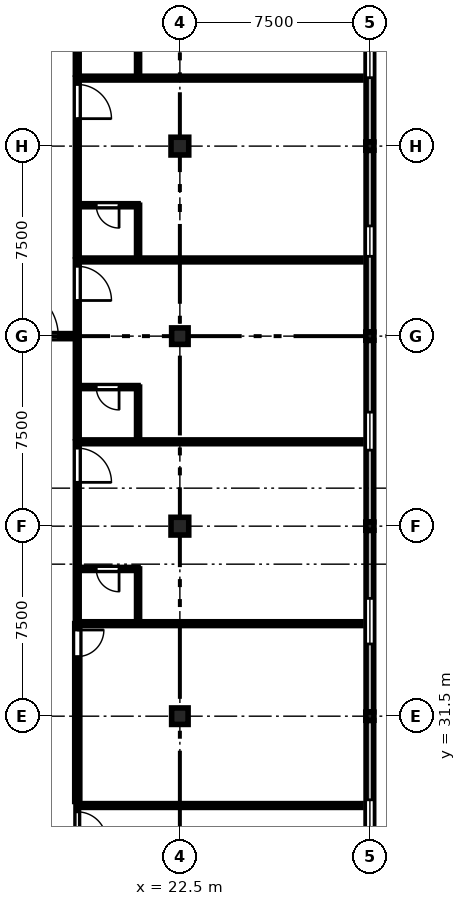
"""IFC4 building model, lengths in metres.
Left out: names, types, materials, properties, quantities, classifications, styles, units other than length and angle.
Written with IfcOpenShell. Run it as: python <this file> out.ifc"""

import sys

from ifc_helpers import new_model, si_unit, direction, frame, frame_2d, origin, origin_2d, place, context, subcontext, project, spatial, rectangle, extrude, element, fill, save


model = new_model("IFC4")
c1 = context("Model", 3, precision=1e-05, world=origin(), true_north=direction((0.0, 1.0)))
c2 = subcontext(c1, "Body", "Model", "MODEL_VIEW")
j1 = project(units=[si_unit("LENGTHUNIT", "METRE"), si_unit("PLANEANGLEUNIT", "RADIAN")], contexts=[c1])
p1 = place(None, origin())
s1 = spatial("IfcSite", under=j1, at=p1, CompositionType="ELEMENT")
p2 = place(p1, origin())
s2 = spatial("IfcBuilding", under=s1, at=p2, CompositionType="ELEMENT")
p3 = place(p2, frame((0.0, 0.0, 17.85)))
s3 = spatial("IfcBuildingStorey", under=s2, at=p3, CompositionType="ELEMENT", Elevation=17.85)
p4 = place(p3, frame((22.5, 31.5, 0.0), z_axis=(0.0, 0.0, 1.0), x_axis=(1.0, 0.0, 0.0)))
e1 = element("IfcColumn", 1, at=p4, inside=s3, PredefinedType="COLUMN", context=c2, shape_type="SweptSolid", body=[
    extrude(rectangle(XDim=0.65, YDim=0.65, at=origin_2d()), origin(), (0.0, 0.0, 1.0), 4.05),
])
p5 = place(p3, frame((22.5, 39.0, 0.0), z_axis=(0.0, 0.0, 1.0), x_axis=(1.0, 0.0, 0.0)))
e2 = element("IfcColumn", 2, at=p5, inside=s3, PredefinedType="COLUMN", context=c2, shape_type="SweptSolid", body=[
    extrude(rectangle(XDim=0.7, YDim=0.7, at=origin_2d()), origin(), (0.0, 0.0, 1.0), 4.05),
])
p6 = place(p3, frame((22.5, 46.5, 0.0), z_axis=(0.0, 0.0, 1.0), x_axis=(1.0, 0.0, 0.0)))
e3 = element("IfcColumn", 3, at=p6, inside=s3, PredefinedType="COLUMN", context=c2, shape_type="SweptSolid", body=[
    extrude(rectangle(XDim=0.65, YDim=0.65, at=origin_2d()), origin(), (0.0, 0.0, 1.0), 4.05),
])
p7 = place(p3, frame((22.5, 54.0, 0.0), z_axis=(0.0, 0.0, 1.0), x_axis=(1.0, 0.0, 0.0)))
e4 = element("IfcColumn", 4, at=p7, inside=s3, PredefinedType="COLUMN", context=c2, shape_type="SweptSolid", body=[
    extrude(rectangle(XDim=0.7, YDim=0.7, at=origin_2d()), origin(), (0.0, 0.0, 1.0), 4.05),
])
for number, where, z_axis, x_axis in (
    (5, (30.0, 31.5, 0.0), (0.0, 0.0, 1.0), (1.0, 0.0, 0.0)),
    (6, (30.0, 39.0, 0.0), (0.0, 0.0, 1.0), (1.0, 0.0, 0.0)),
    (7, (30.0, 46.5, 0.0), (0.0, 0.0, 1.0), (1.0, 0.0, 0.0)),
    (8, (30.0, 54.0, 0.0), (0.0, 0.0, 1.0), (1.0, 0.0, 0.0)),
):
    element("IfcColumn", number, at=place(p3, frame(where, z_axis=z_axis, x_axis=x_axis)), inside=s3, PredefinedType="COLUMN", context=c2, shape_type="SweptSolid", body=[
        extrude(rectangle(XDim=0.32, YDim=0.32, at=origin_2d()), origin(), (0.0, 0.0, 1.0), 4.05),
    ])
p8 = place(p3, frame((30.0, 31.33, 0.0), z_axis=(0.0, 0.0, 1.0), x_axis=(0.0, -1.0, 0.0)))
e9 = element("IfcWall", 9, at=p8, inside=s3, PredefinedType="STANDARD", context=c2, shape_type="SweptSolid", body=[
    extrude(rectangle(XDim=8.66, YDim=0.3, at=frame_2d((4.33, 0.0))), origin(), (0.0, 0.0, 1.0), 3.22),
])
p9 = place(p8, frame((3.13, 0.0, 0.9)))
e10 = element("IfcOpeningElement", 10, at=p9, cuts=e9, PredefinedType="OPENING", context=c2, shape_type="SweptSolid", body=[
    extrude(rectangle(XDim=2.4, YDim=2.04, at=frame_2d((1.2, 1.02))), frame((0.0, 0.16, 0.0), z_axis=(0.0, -1.0, 0.0), x_axis=(1.0, 0.0, 0.0)), (0.0, 0.0, 1.0), 0.32),
])
p10 = place(p3, frame((30.0, 38.83, 0.0), z_axis=(0.0, 0.0, 1.0), x_axis=(0.0, -1.0, 0.0)))
e11 = element("IfcWall", 11, at=p10, inside=s3, PredefinedType="STANDARD", context=c2, shape_type="SweptSolid", body=[
    extrude(rectangle(XDim=7.16, YDim=0.3, at=frame_2d((3.58, 0.0))), origin(), (0.0, 0.0, 1.0), 3.17),
])
p11 = place(p10, frame((2.68, 0.0, 0.9)))
e12 = element("IfcOpeningElement", 12, at=p11, cuts=e11, PredefinedType="OPENING", context=c2, shape_type="SweptSolid", body=[
    extrude(rectangle(XDim=1.8, YDim=1.99, at=frame_2d((0.9, 0.995))), frame((0.0, 0.16, 0.0), z_axis=(0.0, -1.0, 0.0), x_axis=(1.0, 0.0, 0.0)), (0.0, 0.0, 1.0), 0.32),
])
p12 = place(p3, frame((30.0, 46.33, 0.0), z_axis=(0.0, 0.0, 1.0), x_axis=(0.0, -1.0, 0.0)))
e13 = element("IfcWall", 13, at=p12, inside=s3, PredefinedType="STANDARD", context=c2, shape_type="SweptSolid", body=[
    extrude(rectangle(XDim=7.16, YDim=0.3, at=frame_2d((3.58, 0.0))), origin(), (0.0, 0.0, 1.0), 3.17),
])
p13 = place(p12, frame((2.83, 0.0, 0.9)))
e14 = element("IfcOpeningElement", 14, at=p13, cuts=e13, PredefinedType="OPENING", context=c2, shape_type="SweptSolid", body=[
    extrude(rectangle(XDim=1.5, YDim=1.99, at=frame_2d((0.75, 0.995))), frame((0.0, 0.16, 0.0), z_axis=(0.0, -1.0, 0.0), x_axis=(1.0, 0.0, 0.0)), (0.0, 0.0, 1.0), 0.32),
])
p14 = place(p3, frame((30.0, 53.83, 0.0), z_axis=(0.0, 0.0, 1.0), x_axis=(0.0, -1.0, 0.0)))
e15 = element("IfcWall", 15, at=p14, inside=s3, PredefinedType="STANDARD", context=c2, shape_type="SweptSolid", body=[
    extrude(rectangle(XDim=7.16, YDim=0.3, at=frame_2d((3.58, 0.0))), origin(), (0.0, 0.0, 1.0), 3.17),
])
p15 = place(p14, frame((2.98, 0.0, 0.9)))
e16 = element("IfcOpeningElement", 16, at=p15, cuts=e15, PredefinedType="OPENING", context=c2, shape_type="SweptSolid", body=[
    extrude(rectangle(XDim=1.2, YDim=1.99, at=frame_2d((0.6, 0.995))), frame((0.0, 0.16, 0.0), z_axis=(0.0, -1.0, 0.0), x_axis=(1.0, 0.0, 0.0)), (0.0, 0.0, 1.0), 0.32),
])
p16 = place(p3, frame((30.0, 61.33, 0.0), z_axis=(0.0, 0.0, 1.0), x_axis=(0.0, -1.0, 0.0)))
e17 = element("IfcWall", 17, at=p16, inside=s3, PredefinedType="STANDARD", context=c2, shape_type="SweptSolid", body=[
    extrude(rectangle(XDim=7.16, YDim=0.3, at=frame_2d((3.58, 0.0))), origin(), (0.0, 0.0, 1.0), 3.17),
])
p17 = place(p16, frame((2.53, 0.0, 0.9)))
e18 = element("IfcOpeningElement", 18, at=p17, cuts=e17, PredefinedType="OPENING", context=c2, shape_type="SweptSolid", body=[
    extrude(rectangle(XDim=2.1, YDim=1.99, at=frame_2d((1.05, 0.995))), frame((0.0, 0.16, 0.0), z_axis=(0.0, -1.0, 0.0), x_axis=(1.0, 0.0, 0.0)), (0.0, 0.0, 1.0), 0.32),
])
p18 = place(p3, frame((18.45, 27.975, 0.0), z_axis=(0.0, 0.0, 1.0), x_axis=(0.0, -1.0, 0.0)))
e19 = element("IfcWall", 19, at=p18, inside=s3, PredefinedType="PARTITIONING", context=c2, shape_type="SweptSolid", body=[
    extrude(rectangle(XDim=7.017, YDim=0.1, at=frame_2d((3.509, 0.0))), origin(), (0.0, 0.0, 1.0), 3.355),
])
p19 = place(p18, frame((0.25, 0.0, 0.0)))
e20 = element("IfcOpeningElement", 20, at=p19, cuts=e19, PredefinedType="OPENING", context=c2, shape_type="SweptSolid", body=[
    extrude(rectangle(XDim=1.15, YDim=2.2, at=frame_2d((0.575, 1.1))), frame((0.0, 0.06, 0.0), z_axis=(0.0, -1.0, 0.0), x_axis=(1.0, 0.0, 0.0)), (0.0, 0.0, 1.0), 0.12),
])
p20 = place(p3, frame((18.45, 35.152, 0.0), z_axis=(0.0, 0.0, 1.0), x_axis=(0.0, -1.0, 0.0)))
e21 = element("IfcWall", 21, at=p20, inside=s3, PredefinedType="STANDARD", context=c2, shape_type="SweptSolid", body=[
    extrude(rectangle(XDim=7.017, YDim=0.2, at=frame_2d((3.509, 0.0))), origin(), (0.0, 0.0, 1.0), 3.355),
])
p21 = place(p20, frame((0.25, 0.0, 0.0)))
e22 = element("IfcOpeningElement", 22, at=p21, cuts=e21, PredefinedType="OPENING", context=c2, shape_type="SweptSolid", body=[
    extrude(rectangle(XDim=1.05, YDim=2.2, at=frame_2d((0.525, 1.1))), frame((0.0, 0.11, 0.0), z_axis=(0.0, -1.0, 0.0), x_axis=(1.0, 0.0, 0.0)), (0.0, 0.0, 1.0), 0.22),
])
p22 = place(p3, frame((18.45, 42.329, 0.0), z_axis=(0.0, 0.0, 1.0), x_axis=(0.0, -1.0, 0.0)))
e23 = element("IfcWall", 23, at=p22, inside=s3, PredefinedType="PARTITIONING", context=c2, shape_type="SweptSolid", body=[
    extrude(rectangle(XDim=7.017, YDim=0.15, at=frame_2d((3.509, 0.0))), origin(), (0.0, 0.0, 1.0), 3.755),
])
p23 = place(p22, frame((0.25, 0.0, 0.0)))
e24 = element("IfcOpeningElement", 24, at=p23, cuts=e23, PredefinedType="OPENING", context=c2, shape_type="SweptSolid", body=[
    extrude(rectangle(XDim=1.35, YDim=2.25, at=frame_2d((0.675, 1.125))), frame((0.0, 0.085, 0.0), z_axis=(0.0, -1.0, 0.0), x_axis=(1.0, 0.0, 0.0)), (0.0, 0.0, 1.0), 0.17),
])
p24 = place(p3, frame((20.85, 37.312, 0.0), z_axis=(0.0, 0.0, 1.0), x_axis=(-1.0, 0.0, 0.0)))
e25 = element("IfcWall", 25, at=p24, inside=s3, PredefinedType="PARTITIONING", context=c2, shape_type="SweptSolid", body=[
    extrude(rectangle(XDim=2.4, YDim=0.12, at=frame_2d((1.2, 0.0))), origin(), (0.0, 0.0, 1.0), 3.755),
])
p25 = place(p24, frame((0.75, 0.0, 0.0)))
e26 = element("IfcOpeningElement", 26, at=p25, cuts=e25, PredefinedType="OPENING", context=c2, shape_type="SweptSolid", body=[
    extrude(rectangle(XDim=0.9, YDim=2.1, at=frame_2d((0.45, 1.05))), frame((0.0, 0.07, 0.0), z_axis=(0.0, -1.0, 0.0), x_axis=(1.0, 0.0, 0.0)), (0.0, 0.0, 1.0), 0.14),
])
p26 = place(p3, frame((20.85, 35.312, 0.0), z_axis=(0.0, 0.0, 1.0), x_axis=(0.0, 1.0, 0.0)))
e27 = element("IfcWall", 27, at=p26, inside=s3, PredefinedType="PARTITIONING", context=c2, shape_type="SweptSolid", body=[
    extrude(rectangle(XDim=2.0, YDim=0.12, at=frame_2d((1.0, 0.0))), origin(), (0.0, 0.0, 1.0), 3.755),
])
p27 = place(p3, frame((18.45, 49.506, 0.0), z_axis=(0.0, 0.0, 1.0), x_axis=(0.0, -1.0, 0.0)))
e28 = element("IfcWall", 28, at=p27, inside=s3, PredefinedType="PARTITIONING", context=c2, shape_type="SweptSolid", body=[
    extrude(rectangle(XDim=7.017, YDim=0.15, at=frame_2d((3.509, 0.0))), origin(), (0.0, 0.0, 1.0), 3.755),
])
p28 = place(p27, frame((0.25, 0.0, 0.0)))
e29 = element("IfcOpeningElement", 29, at=p28, cuts=e28, PredefinedType="OPENING", context=c2, shape_type="SweptSolid", body=[
    extrude(rectangle(XDim=1.35, YDim=2.25, at=frame_2d((0.675, 1.125))), frame((0.0, 0.085, 0.0), z_axis=(0.0, -1.0, 0.0), x_axis=(1.0, 0.0, 0.0)), (0.0, 0.0, 1.0), 0.17),
])
p29 = place(p3, frame((20.85, 44.489, 0.0), z_axis=(0.0, 0.0, 1.0), x_axis=(-1.0, 0.0, 0.0)))
e30 = element("IfcWall", 30, at=p29, inside=s3, PredefinedType="PARTITIONING", context=c2, shape_type="SweptSolid", body=[
    extrude(rectangle(XDim=2.4, YDim=0.12, at=frame_2d((1.2, 0.0))), origin(), (0.0, 0.0, 1.0), 3.755),
])
p30 = place(p29, frame((0.75, 0.0, 0.0)))
e31 = element("IfcOpeningElement", 31, at=p30, cuts=e30, PredefinedType="OPENING", context=c2, shape_type="SweptSolid", body=[
    extrude(rectangle(XDim=0.9, YDim=2.1, at=frame_2d((0.45, 1.05))), frame((0.0, 0.07, 0.0), z_axis=(0.0, -1.0, 0.0), x_axis=(1.0, 0.0, 0.0)), (0.0, 0.0, 1.0), 0.14),
])
p31 = place(p3, frame((20.85, 42.489, 0.0), z_axis=(0.0, 0.0, 1.0), x_axis=(0.0, 1.0, 0.0)))
e32 = element("IfcWall", 32, at=p31, inside=s3, PredefinedType="PARTITIONING", context=c2, shape_type="SweptSolid", body=[
    extrude(rectangle(XDim=2.0, YDim=0.12, at=frame_2d((1.0, 0.0))), origin(), (0.0, 0.0, 1.0), 3.755),
])
p32 = place(p3, frame((18.45, 56.684, 0.0), z_axis=(0.0, 0.0, 1.0), x_axis=(0.0, -1.0, 0.0)))
e33 = element("IfcWall", 33, at=p32, inside=s3, PredefinedType="PARTITIONING", context=c2, shape_type="SweptSolid", body=[
    extrude(rectangle(XDim=7.017, YDim=0.15, at=frame_2d((3.509, 0.0))), origin(), (0.0, 0.0, 1.0), 3.755),
])
p33 = place(p32, frame((0.25, 0.0, 0.0)))
e34 = element("IfcOpeningElement", 34, at=p33, cuts=e33, PredefinedType="OPENING", context=c2, shape_type="SweptSolid", body=[
    extrude(rectangle(XDim=1.35, YDim=2.25, at=frame_2d((0.675, 1.125))), frame((0.0, 0.085, 0.0), z_axis=(0.0, -1.0, 0.0), x_axis=(1.0, 0.0, 0.0)), (0.0, 0.0, 1.0), 0.17),
])
p34 = place(p3, frame((20.85, 51.667, 0.0), z_axis=(0.0, 0.0, 1.0), x_axis=(-1.0, 0.0, 0.0)))
e35 = element("IfcWall", 35, at=p34, inside=s3, PredefinedType="PARTITIONING", context=c2, shape_type="SweptSolid", body=[
    extrude(rectangle(XDim=2.4, YDim=0.12, at=frame_2d((1.2, 0.0))), origin(), (0.0, 0.0, 1.0), 3.755),
])
p35 = place(p34, frame((0.75, 0.0, 0.0)))
e36 = element("IfcOpeningElement", 36, at=p35, cuts=e35, PredefinedType="OPENING", context=c2, shape_type="SweptSolid", body=[
    extrude(rectangle(XDim=0.9, YDim=2.1, at=frame_2d((0.45, 1.05))), frame((0.0, 0.07, 0.0), z_axis=(0.0, -1.0, 0.0), x_axis=(1.0, 0.0, 0.0)), (0.0, 0.0, 1.0), 0.14),
])
p36 = place(p3, frame((20.85, 49.667, 0.0), z_axis=(0.0, 0.0, 1.0), x_axis=(0.0, 1.0, 0.0)))
e37 = element("IfcWall", 37, at=p36, inside=s3, PredefinedType="PARTITIONING", context=c2, shape_type="SweptSolid", body=[
    extrude(rectangle(XDim=2.0, YDim=0.12, at=frame_2d((1.0, 0.0))), origin(), (0.0, 0.0, 1.0), 3.755),
])
p37 = place(p3, frame((18.45, 63.861, 0.0), z_axis=(0.0, 0.0, 1.0), x_axis=(0.0, -1.0, 0.0)))
e38 = element("IfcWall", 38, at=p37, inside=s3, PredefinedType="PARTITIONING", context=c2, shape_type="SweptSolid", body=[
    extrude(rectangle(XDim=7.017, YDim=0.15, at=frame_2d((3.509, 0.0))), origin(), (0.0, 0.0, 1.0), 3.755),
])
p38 = place(p37, frame((0.25, 0.0, 0.0)))
e39 = element("IfcOpeningElement", 39, at=p38, cuts=e38, PredefinedType="OPENING", context=c2, shape_type="SweptSolid", body=[
    extrude(rectangle(XDim=1.35, YDim=2.25, at=frame_2d((0.675, 1.125))), frame((0.0, 0.085, 0.0), z_axis=(0.0, -1.0, 0.0), x_axis=(1.0, 0.0, 0.0)), (0.0, 0.0, 1.0), 0.17),
])
p39 = place(p3, frame((20.85, 56.844, 0.0), z_axis=(0.0, 0.0, 1.0), x_axis=(0.0, 1.0, 0.0)))
e40 = element("IfcWall", 40, at=p39, inside=s3, PredefinedType="PARTITIONING", context=c2, shape_type="SweptSolid", body=[
    extrude(rectangle(XDim=2.0, YDim=0.12, at=frame_2d((1.0, 0.0))), origin(), (0.0, 0.0, 1.0), 3.755),
])
for number, where, z_axis, x_axis in (
    (41, (18.45, 27.975, 0.0), (0.0, 0.0, 1.0), (1.0, 0.0, 0.0)),
    (42, (18.45, 35.152, 0.0), (0.0, 0.0, 1.0), (1.0, 0.0, 0.0)),
    (43, (18.45, 42.329, 0.0), (0.0, 0.0, 1.0), (1.0, 0.0, 0.0)),
    (44, (18.45, 49.506, 0.0), (0.0, 0.0, 1.0), (1.0, 0.0, 0.0)),
    (45, (18.45, 56.684, 0.0), (0.0, 0.0, 1.0), (1.0, 0.0, 0.0)),
):
    element("IfcWall", number, at=place(p3, frame(where, z_axis=z_axis, x_axis=x_axis)), inside=s3, PredefinedType="PARTITIONING", context=c2, shape_type="SweptSolid", body=[
        extrude(rectangle(XDim=11.2, YDim=0.15, at=frame_2d((5.6, 0.0))), origin(), (0.0, 0.0, 1.0), 3.755),
    ])
p40 = place(p3, frame((15.2, 46.5, 0.0), z_axis=(0.0, 0.0, 1.0), x_axis=(1.0, 0.0, 0.0)))
e46 = element("IfcWall", 46, at=p40, inside=s3, PredefinedType="STANDARD", context=c2, shape_type="SweptSolid", body=[
    extrude(rectangle(XDim=3.0, YDim=0.2, at=frame_2d((1.5, 0.0))), origin(), (0.0, 0.0, 1.0), 3.155),
])
p41 = place(p40, frame((0.5, 0.0, 0.0)))
e47 = element("IfcOpeningElement", 47, at=p41, cuts=e46, PredefinedType="OPENING", context=c2, shape_type="SweptSolid", body=[
    extrude(rectangle(XDim=2.0, YDim=2.3, at=frame_2d((1.0, 1.15))), frame((0.0, 0.11, 0.0), z_axis=(0.0, -1.0, 0.0), x_axis=(1.0, 0.0, 0.0)), (0.0, 0.0, 1.0), 0.22),
])
p42 = place(p9, origin())
e48 = element("IfcWindow", 48, at=p42, inside=s3, PartitioningType="SINGLE_PANEL", PredefinedType="WINDOW", context=c2, shape_type="SweptSolid", body=[
    extrude(rectangle(XDim=2.4, YDim=2.04, at=frame_2d((1.2, 1.02))), frame((0.0, 0.03, 0.0), z_axis=(0.0, -1.0, 0.0), x_axis=(1.0, 0.0, 0.0)), (0.0, 0.0, 1.0), 0.06),
])
fill(e10, e48)
p43 = place(p11, origin())
e49 = element("IfcWindow", 49, at=p43, inside=s3, PartitioningType="SINGLE_PANEL", PredefinedType="WINDOW", context=c2, shape_type="SweptSolid", body=[
    extrude(rectangle(XDim=1.8, YDim=1.99, at=frame_2d((0.9, 0.995))), frame((0.0, 0.03, 0.0), z_axis=(0.0, -1.0, 0.0), x_axis=(1.0, 0.0, 0.0)), (0.0, 0.0, 1.0), 0.06),
])
fill(e12, e49)
p44 = place(p13, origin())
e50 = element("IfcWindow", 50, at=p44, inside=s3, PartitioningType="SINGLE_PANEL", PredefinedType="WINDOW", context=c2, shape_type="SweptSolid", body=[
    extrude(rectangle(XDim=1.5, YDim=1.99, at=frame_2d((0.75, 0.995))), frame((0.0, 0.03, 0.0), z_axis=(0.0, -1.0, 0.0), x_axis=(1.0, 0.0, 0.0)), (0.0, 0.0, 1.0), 0.06),
])
fill(e14, e50)
p45 = place(p15, origin())
e51 = element("IfcWindow", 51, at=p45, inside=s3, PartitioningType="SINGLE_PANEL", PredefinedType="WINDOW", context=c2, shape_type="SweptSolid", body=[
    extrude(rectangle(XDim=1.2, YDim=1.99, at=frame_2d((0.6, 0.995))), frame((0.0, 0.03, 0.0), z_axis=(0.0, -1.0, 0.0), x_axis=(1.0, 0.0, 0.0)), (0.0, 0.0, 1.0), 0.06),
])
fill(e16, e51)
p46 = place(p17, origin())
e52 = element("IfcWindow", 52, at=p46, inside=s3, PartitioningType="SINGLE_PANEL", PredefinedType="WINDOW", context=c2, shape_type="SweptSolid", body=[
    extrude(rectangle(XDim=2.1, YDim=1.99, at=frame_2d((1.05, 0.995))), frame((0.0, 0.03, 0.0), z_axis=(0.0, -1.0, 0.0), x_axis=(1.0, 0.0, 0.0)), (0.0, 0.0, 1.0), 0.06),
])
fill(e18, e52)
p47 = place(p19, origin())
e53 = element("IfcDoor", 53, at=p47, inside=s3, OperationType="SINGLE_SWING_RIGHT", PredefinedType="DOOR", context=c2, shape_type="SweptSolid", body=[
    extrude(rectangle(XDim=1.15, YDim=2.2, at=frame_2d((0.575, 1.1))), frame((0.0, 0.025, 0.0), z_axis=(0.0, -1.0, 0.0), x_axis=(1.0, 0.0, 0.0)), (0.0, 0.0, 1.0), 0.05),
])
fill(e20, e53)
p48 = place(p21, origin())
e54 = element("IfcDoor", 54, at=p48, inside=s3, OperationType="SINGLE_SWING_LEFT", PredefinedType="DOOR", context=c2, shape_type="SweptSolid", body=[
    extrude(rectangle(XDim=1.05, YDim=2.2, at=frame_2d((0.525, 1.1))), frame((0.0, 0.025, 0.0), z_axis=(0.0, -1.0, 0.0), x_axis=(1.0, 0.0, 0.0)), (0.0, 0.0, 1.0), 0.05),
])
fill(e22, e54)
p49 = place(p23, origin())
e55 = element("IfcDoor", 55, at=p49, inside=s3, OperationType="SINGLE_SWING_RIGHT", PredefinedType="DOOR", context=c2, shape_type="SweptSolid", body=[
    extrude(rectangle(XDim=1.35, YDim=2.25, at=frame_2d((0.675, 1.125))), frame((0.0, 0.025, 0.0), z_axis=(0.0, -1.0, 0.0), x_axis=(1.0, 0.0, 0.0)), (0.0, 0.0, 1.0), 0.05),
])
fill(e24, e55)
p50 = place(p25, origin())
e56 = element("IfcDoor", 56, at=p50, inside=s3, OperationType="SINGLE_SWING_LEFT", PredefinedType="DOOR", context=c2, shape_type="SweptSolid", body=[
    extrude(rectangle(XDim=0.9, YDim=2.1, at=frame_2d((0.45, 1.05))), frame((0.0, 0.025, 0.0), z_axis=(0.0, -1.0, 0.0), x_axis=(1.0, 0.0, 0.0)), (0.0, 0.0, 1.0), 0.05),
])
fill(e26, e56)
p51 = place(p28, origin())
e57 = element("IfcDoor", 57, at=p51, inside=s3, OperationType="SINGLE_SWING_RIGHT", PredefinedType="DOOR", context=c2, shape_type="SweptSolid", body=[
    extrude(rectangle(XDim=1.35, YDim=2.25, at=frame_2d((0.675, 1.125))), frame((0.0, 0.025, 0.0), z_axis=(0.0, -1.0, 0.0), x_axis=(1.0, 0.0, 0.0)), (0.0, 0.0, 1.0), 0.05),
])
fill(e29, e57)
p52 = place(p30, origin())
e58 = element("IfcDoor", 58, at=p52, inside=s3, OperationType="SINGLE_SWING_LEFT", PredefinedType="DOOR", context=c2, shape_type="SweptSolid", body=[
    extrude(rectangle(XDim=0.9, YDim=2.1, at=frame_2d((0.45, 1.05))), frame((0.0, 0.025, 0.0), z_axis=(0.0, -1.0, 0.0), x_axis=(1.0, 0.0, 0.0)), (0.0, 0.0, 1.0), 0.05),
])
fill(e31, e58)
p53 = place(p33, origin())
e59 = element("IfcDoor", 59, at=p53, inside=s3, OperationType="SINGLE_SWING_RIGHT", PredefinedType="DOOR", context=c2, shape_type="SweptSolid", body=[
    extrude(rectangle(XDim=1.35, YDim=2.25, at=frame_2d((0.675, 1.125))), frame((0.0, 0.025, 0.0), z_axis=(0.0, -1.0, 0.0), x_axis=(1.0, 0.0, 0.0)), (0.0, 0.0, 1.0), 0.05),
])
fill(e34, e59)
p54 = place(p35, origin())
e60 = element("IfcDoor", 60, at=p54, inside=s3, OperationType="SINGLE_SWING_LEFT", PredefinedType="DOOR", context=c2, shape_type="SweptSolid", body=[
    extrude(rectangle(XDim=0.9, YDim=2.1, at=frame_2d((0.45, 1.05))), frame((0.0, 0.025, 0.0), z_axis=(0.0, -1.0, 0.0), x_axis=(1.0, 0.0, 0.0)), (0.0, 0.0, 1.0), 0.05),
])
fill(e36, e60)
p55 = place(p41, origin())
e61 = element("IfcDoor", 61, at=p55, inside=s3, OperationType="DOUBLE_DOOR_SINGLE_SWING", PredefinedType="DOOR", context=c2, shape_type="SweptSolid", body=[
    extrude(rectangle(XDim=2.0, YDim=2.3, at=frame_2d((1.0, 1.15))), frame((0.0, 0.025, 0.0), z_axis=(0.0, -1.0, 0.0), x_axis=(1.0, 0.0, 0.0)), (0.0, 0.0, 1.0), 0.05),
])
fill(e47, e61)
save(model, sys.argv[1])
